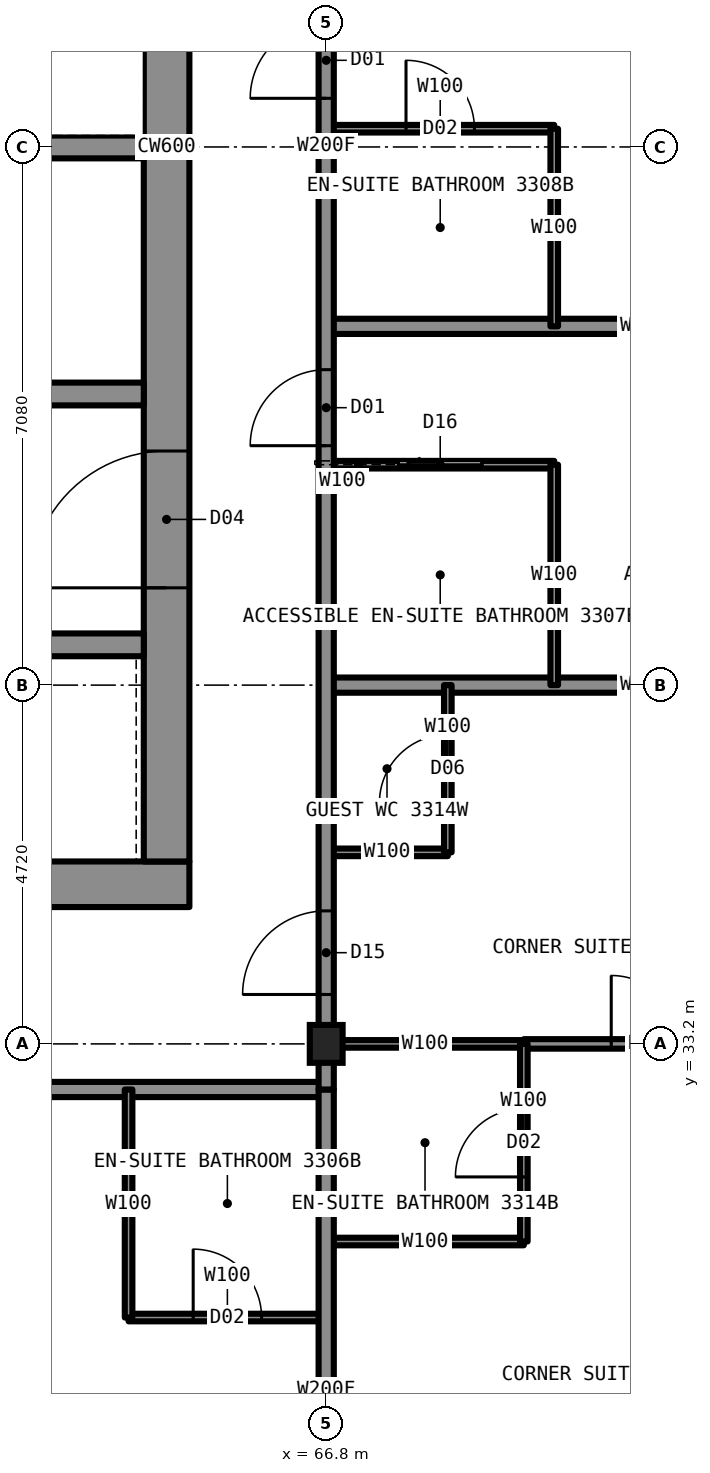
"""IFC4 building model, lengths in metres.
Left out: names, types, materials, properties, quantities, classifications, styles, units other than length and angle.
Written with IfcOpenShell. Run it as: python <this file> out.ifc"""

import sys

from ifc_helpers import new_model, si_unit, direction, frame, frame_2d, origin, origin_2d, place, context, subcontext, project, spatial, rectangle, i_section, extrude, element, fill, save


model = new_model("IFC4")
c1 = context("Model", 3, precision=1e-05, world=origin(), true_north=direction((0.0, 1.0)))
c2 = subcontext(c1, "Body", "Model", "MODEL_VIEW")
j1 = project(units=[si_unit("LENGTHUNIT", "METRE"), si_unit("PLANEANGLEUNIT", "RADIAN")], contexts=[c1])
p1 = place(None, origin())
s1 = spatial("IfcSite", under=j1, at=p1, CompositionType="ELEMENT")
p2 = place(p1, origin())
s2 = spatial("IfcBuilding", under=s1, at=p2, CompositionType="ELEMENT")
p3 = place(p2, frame((0.0, 0.0, 124.9)))
s3 = spatial("IfcBuildingStorey", under=s2, at=p3, CompositionType="ELEMENT", Elevation=124.9)
p4 = place(p3, frame((66.8, 33.2, 0.0), z_axis=(0.0, 0.0, 1.0), x_axis=(1.0, 0.0, 0.0)))
e1 = element("IfcColumn", 1, at=p4, inside=s3, PredefinedType="COLUMN", context=c2, shape_type="SweptSolid", body=[
    extrude(i_section(OverallWidth=0.432, OverallDepth=0.498, WebThickness=0.056, FlangeThickness=0.089, at=origin_2d()), origin(), (0.0, 0.0, 1.0), 3.5),
])
p5 = place(p3, frame((45.0, 35.3, 0.0), z_axis=(0.0, 0.0, 1.0), x_axis=(1.0, 0.0, 0.0)))
e2 = element("IfcWall", 2, at=p5, inside=s3, PredefinedType="SHEAR", context=c2, shape_type="SweptSolid", body=[
    extrude(rectangle(XDim=20.0, YDim=0.6, at=frame_2d((10.0, 0.0))), origin(), (0.0, 0.0, 1.0), 3.5),
])
p6 = place(p3, frame((64.7, 35.6, 0.0), z_axis=(0.0, 0.0, 1.0), x_axis=(0.0, 1.0, 0.0)))
e3 = element("IfcWall", 3, at=p6, inside=s3, PredefinedType="SHEAR", context=c2, shape_type="SweptSolid", body=[
    extrude(rectangle(XDim=18.8, YDim=0.6, at=frame_2d((9.4, 0.0))), origin(), (0.0, 0.0, 1.0), 3.5),
])
p7 = place(p6, frame((13.4, 0.0, 0.0)))
e4 = element("IfcOpeningElement", 4, at=p7, cuts=e3, PredefinedType="OPENING", context=c2, shape_type="SweptSolid", body=[
    extrude(rectangle(XDim=1.8, YDim=2.2, at=frame_2d((0.9, 1.1))), frame((0.0, 0.31, 0.0), z_axis=(0.0, -1.0, 0.0), x_axis=(1.0, 0.0, 0.0)), (0.0, 0.0, 1.0), 0.62),
])
p8 = place(p6, frame((3.6, 0.0, 0.0)))
e5 = element("IfcOpeningElement", 5, at=p8, cuts=e3, PredefinedType="OPENING", context=c2, shape_type="SweptSolid", body=[
    extrude(rectangle(XDim=1.8, YDim=2.2, at=frame_2d((0.9, 1.1))), frame((0.0, 0.31, 0.0), z_axis=(0.0, -1.0, 0.0), x_axis=(1.0, 0.0, 0.0)), (0.0, 0.0, 1.0), 0.62),
])
p9 = place(p3, frame((45.6, 38.45, 0.0), z_axis=(0.0, 0.0, 1.0), x_axis=(1.0, 0.0, 0.0)))
e6 = element("IfcWall", 6, at=p9, inside=s3, PredefinedType="SHEAR", context=c2, shape_type="SweptSolid", body=[
    extrude(rectangle(XDim=18.8, YDim=0.3, at=frame_2d((9.4, 0.0))), origin(), (0.0, 0.0, 1.0), 3.5),
])
p10 = place(p3, frame((56.2, 41.75, 0.0), z_axis=(0.0, 0.0, 1.0), x_axis=(1.0, 0.0, 0.0)))
e7 = element("IfcWall", 7, at=p10, inside=s3, PredefinedType="SHEAR", context=c2, shape_type="SweptSolid", body=[
    extrude(rectangle(XDim=8.2, YDim=0.3, at=frame_2d((4.1, 0.0))), origin(), (0.0, 0.0, 1.0), 3.5),
])
p11 = place(p10, frame((3.3, 0.0, 0.0)))
e8 = element("IfcOpeningElement", 8, at=p11, cuts=e7, PredefinedType="OPENING", context=c2, shape_type="SweptSolid", body=[
    extrude(rectangle(XDim=1.0, YDim=2.1, at=frame_2d((0.5, 1.05))), frame((0.0, 0.16, 0.0), z_axis=(0.0, -1.0, 0.0), x_axis=(1.0, 0.0, 0.0)), (0.0, 0.0, 1.0), 0.32),
])
p12 = place(p3, frame((56.5, 45.0, 0.0), z_axis=(0.0, 0.0, 1.0), x_axis=(1.0, 0.0, 0.0)))
e9 = element("IfcWall", 9, at=p12, inside=s3, PredefinedType="SHEAR", context=c2, shape_type="SweptSolid", body=[
    extrude(rectangle(XDim=7.9, YDim=0.3, at=frame_2d((3.95, 0.0))), origin(), (0.0, 0.0, 1.0), 3.5),
])
p13 = place(p3, frame((66.8, 33.2, 0.0), z_axis=(0.0, 0.0, 1.0), x_axis=(1.0, 0.0, 0.0)))
e10 = element("IfcWall", 10, at=p13, inside=s3, PredefinedType="PARTITIONING", context=c2, shape_type="SweptSolid", body=[
    extrude(rectangle(XDim=2.6, YDim=0.1, at=frame_2d((1.3, 0.0))), origin(), (0.0, 0.0, 1.0), 2.573),
])
p14 = place(p3, frame((69.4, 33.2, 0.0), z_axis=(0.0, 0.0, 1.0), x_axis=(1.0, 0.0, 0.0)))
e11 = element("IfcWall", 11, at=p14, inside=s3, PredefinedType="PARTITIONING", context=c2, shape_type="SweptSolid", body=[
    extrude(rectangle(XDim=5.9, YDim=0.125, at=frame_2d((2.95, 0.0))), origin(), (0.0, 0.0, 1.0), 2.573),
])
p15 = place(p14, frame((1.15, 0.0, 0.0)))
e12 = element("IfcOpeningElement", 12, at=p15, cuts=e11, PredefinedType="OPENING", context=c2, shape_type="SweptSolid", body=[
    extrude(rectangle(XDim=0.9, YDim=2.2, at=frame_2d((0.45, 1.1))), frame((0.0, 0.073, 0.0), z_axis=(0.0, -1.0, 0.0), x_axis=(1.0, 0.0, 0.0)), (0.0, 0.0, 1.0), 0.145),
])
p16 = place(p3, frame((43.2, 32.6, 0.0), z_axis=(0.0, 0.0, 1.0), x_axis=(1.0, 0.0, 0.0)))
e13 = element("IfcWall", 13, at=p16, inside=s3, PredefinedType="PARTITIONING", context=c2, shape_type="SweptSolid", body=[
    extrude(rectangle(XDim=23.6, YDim=0.2, at=frame_2d((11.8, 0.0))), origin(), (0.0, 0.0, 1.0), 3.33),
])
p17 = place(p16, frame((3.0, 0.0, 0.0)))
e14 = element("IfcOpeningElement", 14, at=p17, cuts=e13, PredefinedType="OPENING", context=c2, shape_type="SweptSolid", body=[
    extrude(rectangle(XDim=1.0, YDim=2.2, at=frame_2d((0.5, 1.1))), frame((0.0, 0.11, 0.0), z_axis=(0.0, -1.0, 0.0), x_axis=(1.0, 0.0, 0.0)), (0.0, 0.0, 1.0), 0.22),
])
p18 = place(p16, frame((11.29, 0.0, 0.0)))
e15 = element("IfcOpeningElement", 15, at=p18, cuts=e13, PredefinedType="OPENING", context=c2, shape_type="SweptSolid", body=[
    extrude(rectangle(XDim=1.1, YDim=2.2, at=frame_2d((0.55, 1.1))), frame((0.0, 0.11, 0.0), z_axis=(0.0, -1.0, 0.0), x_axis=(1.0, 0.0, 0.0)), (0.0, 0.0, 1.0), 0.22),
])
p19 = place(p3, frame((66.8, 30.6, 0.0), z_axis=(0.0, 0.0, 1.0), x_axis=(1.0, 0.0, 0.0)))
e16 = element("IfcWall", 16, at=p19, inside=s3, PredefinedType="PARTITIONING", context=c2, shape_type="SweptSolid", body=[
    extrude(rectangle(XDim=2.6, YDim=0.1, at=frame_2d((1.3, 0.0))), origin(), (0.0, 0.0, 1.0), 3.33),
])
p20 = place(p3, frame((64.2, 29.6, 0.0), z_axis=(0.0, 0.0, 1.0), x_axis=(1.0, 0.0, 0.0)))
e17 = element("IfcWall", 17, at=p20, inside=s3, PredefinedType="PARTITIONING", context=c2, shape_type="SweptSolid", body=[
    extrude(rectangle(XDim=2.6, YDim=0.1, at=frame_2d((1.3, 0.0))), origin(), (0.0, 0.0, 1.0), 3.33),
])
p21 = place(p20, frame((0.85, 0.0, 0.0)))
e18 = element("IfcOpeningElement", 18, at=p21, cuts=e17, PredefinedType="OPENING", context=c2, shape_type="SweptSolid", body=[
    extrude(rectangle(XDim=0.9, YDim=2.1, at=frame_2d((0.45, 1.05))), frame((0.0, 0.06, 0.0), z_axis=(0.0, -1.0, 0.0), x_axis=(1.0, 0.0, 0.0)), (0.0, 0.0, 1.0), 0.12),
])
p22 = place(p3, frame((66.8, 42.64, 0.0), z_axis=(0.0, 0.0, 1.0), x_axis=(1.0, 0.0, 0.0)))
e19 = element("IfcWall", 19, at=p22, inside=s3, PredefinedType="PARTITIONING", context=c2, shape_type="SweptSolid", body=[
    extrude(rectangle(XDim=8.5, YDim=0.2, at=frame_2d((4.25, 0.0))), origin(), (0.0, 0.0, 1.0), 2.731),
])
p23 = place(p3, frame((66.8, 40.82, 0.0), z_axis=(0.0, 0.0, 1.0), x_axis=(1.0, 0.0, 0.0)))
e20 = element("IfcWall", 20, at=p23, inside=s3, PredefinedType="PARTITIONING", context=c2, shape_type="SweptSolid", body=[
    extrude(rectangle(XDim=3.0, YDim=0.1, at=frame_2d((1.5, 0.0))), origin(), (0.0, 0.0, 1.0), 3.33),
])
p24 = place(p23, frame((0.95, 0.0, 0.0)))
e21 = element("IfcOpeningElement", 21, at=p24, cuts=e20, PredefinedType="OPENING", context=c2, shape_type="SweptSolid", body=[
    extrude(rectangle(XDim=1.1, YDim=2.1, at=frame_2d((0.55, 1.05))), frame((0.0, 0.06, 0.0), z_axis=(0.0, -1.0, 0.0), x_axis=(1.0, 0.0, 0.0)), (0.0, 0.0, 1.0), 0.12),
])
p25 = place(p3, frame((66.8, 37.92, 0.0), z_axis=(0.0, 0.0, 1.0), x_axis=(1.0, 0.0, 0.0)))
e22 = element("IfcWall", 22, at=p25, inside=s3, PredefinedType="PARTITIONING", context=c2, shape_type="SweptSolid", body=[
    extrude(rectangle(XDim=8.5, YDim=0.2, at=frame_2d((4.25, 0.0))), origin(), (0.0, 0.0, 1.0), 2.573),
])
p26 = place(p3, frame((66.8, 35.72, 0.0), z_axis=(0.0, 0.0, 1.0), x_axis=(1.0, 0.0, 0.0)))
e23 = element("IfcWall", 23, at=p26, inside=s3, PredefinedType="PARTITIONING", context=c2, shape_type="SweptSolid", body=[
    extrude(rectangle(XDim=1.6, YDim=0.1, at=frame_2d((0.8, 0.0))), origin(), (0.0, 0.0, 1.0), 3.33),
])
p27 = place(p3, frame((66.8, 45.24, 0.0), z_axis=(0.0, 0.0, 1.0), x_axis=(1.0, 0.0, 0.0)))
e24 = element("IfcWall", 24, at=p27, inside=s3, PredefinedType="PARTITIONING", context=c2, shape_type="SweptSolid", body=[
    extrude(rectangle(XDim=3.0, YDim=0.1, at=frame_2d((1.5, 0.0))), origin(), (0.0, 0.0, 1.0), 3.33),
])
p28 = place(p27, frame((1.05, 0.0, 0.0)))
e25 = element("IfcOpeningElement", 25, at=p28, cuts=e24, PredefinedType="OPENING", context=c2, shape_type="SweptSolid", body=[
    extrude(rectangle(XDim=0.9, YDim=2.1, at=frame_2d((0.45, 1.05))), frame((0.0, 0.06, 0.0), z_axis=(0.0, -1.0, 0.0), x_axis=(1.0, 0.0, 0.0)), (0.0, 0.0, 1.0), 0.12),
])
p29 = place(p3, frame((66.8, 33.22, 0.0), z_axis=(0.0, 0.0, 1.0), x_axis=(0.0, 1.0, 0.0)))
e26 = element("IfcWall", 26, at=p29, inside=s3, PredefinedType="PARTITIONING", context=c2, shape_type="SweptSolid", body=[
    extrude(rectangle(XDim=23.58, YDim=0.2, at=frame_2d((11.79, 0.0))), origin(), (0.0, 0.0, 1.0), 3.33),
])
p30 = place(p29, frame((7.85, 0.0, 0.0)))
e27 = element("IfcOpeningElement", 27, at=p30, cuts=e26, PredefinedType="OPENING", context=c2, shape_type="SweptSolid", body=[
    extrude(rectangle(XDim=1.0, YDim=2.2, at=frame_2d((0.5, 1.1))), frame((0.0, 0.11, 0.0), z_axis=(0.0, -1.0, 0.0), x_axis=(1.0, 0.0, 0.0)), (0.0, 0.0, 1.0), 0.22),
])
p31 = place(p29, frame((12.42, 0.0, 0.0)))
e28 = element("IfcOpeningElement", 28, at=p31, cuts=e26, PredefinedType="OPENING", context=c2, shape_type="SweptSolid", body=[
    extrude(rectangle(XDim=1.0, YDim=2.2, at=frame_2d((0.5, 1.1))), frame((0.0, 0.11, 0.0), z_axis=(0.0, -1.0, 0.0), x_axis=(1.0, 0.0, 0.0)), (0.0, 0.0, 1.0), 0.22),
])
p32 = place(p29, frame((21.83, 0.0, 0.0)))
e29 = element("IfcOpeningElement", 29, at=p32, cuts=e26, PredefinedType="OPENING", context=c2, shape_type="SweptSolid", body=[
    extrude(rectangle(XDim=1.1, YDim=2.2, at=frame_2d((0.55, 1.1))), frame((0.0, 0.11, 0.0), z_axis=(0.0, -1.0, 0.0), x_axis=(1.0, 0.0, 0.0)), (0.0, 0.0, 1.0), 0.22),
])
p33 = place(p29, frame((0.63, 0.0, 0.0)))
e30 = element("IfcOpeningElement", 30, at=p33, cuts=e26, PredefinedType="OPENING", context=c2, shape_type="SweptSolid", body=[
    extrude(rectangle(XDim=1.1, YDim=2.2, at=frame_2d((0.55, 1.1))), frame((0.0, 0.11, 0.0), z_axis=(0.0, -1.0, 0.0), x_axis=(1.0, 0.0, 0.0)), (0.0, 0.0, 1.0), 0.22),
])
p34 = place(p3, frame((66.8, 24.7, 0.0), z_axis=(0.0, 0.0, 1.0), x_axis=(0.0, 1.0, 0.0)))
e31 = element("IfcWall", 31, at=p34, inside=s3, PredefinedType="PARTITIONING", context=c2, shape_type="SweptSolid", body=[
    extrude(rectangle(XDim=7.9, YDim=0.2, at=frame_2d((3.95, 0.0))), origin(), (0.0, 0.0, 1.0), 2.573),
])
p35 = place(p3, frame((68.4, 35.72, 0.0), z_axis=(0.0, 0.0, 1.0), x_axis=(0.0, 1.0, 0.0)))
e32 = element("IfcWall", 32, at=p35, inside=s3, PredefinedType="PARTITIONING", context=c2, shape_type="SweptSolid", body=[
    extrude(rectangle(XDim=2.2, YDim=0.1, at=frame_2d((1.1, 0.0))), origin(), (0.0, 0.0, 1.0), 3.33),
])
p36 = place(p35, frame((0.65, 0.0, 0.0)))
e33 = element("IfcOpeningElement", 33, at=p36, cuts=e32, PredefinedType="OPENING", context=c2, shape_type="SweptSolid", body=[
    extrude(rectangle(XDim=0.9, YDim=2.1, at=frame_2d((0.45, 1.05))), frame((0.0, 0.06, 0.0), z_axis=(0.0, -1.0, 0.0), x_axis=(1.0, 0.0, 0.0)), (0.0, 0.0, 1.0), 0.12),
])
p37 = place(p3, frame((69.4, 30.6, 0.0), z_axis=(0.0, 0.0, 1.0), x_axis=(0.0, 1.0, 0.0)))
e34 = element("IfcWall", 34, at=p37, inside=s3, PredefinedType="PARTITIONING", context=c2, shape_type="SweptSolid", body=[
    extrude(rectangle(XDim=2.6, YDim=0.1, at=frame_2d((1.3, 0.0))), origin(), (0.0, 0.0, 1.0), 3.33),
])
p38 = place(p37, frame((0.85, 0.0, 0.0)))
e35 = element("IfcOpeningElement", 35, at=p38, cuts=e34, PredefinedType="OPENING", context=c2, shape_type="SweptSolid", body=[
    extrude(rectangle(XDim=0.9, YDim=2.1, at=frame_2d((0.45, 1.05))), frame((0.0, 0.06, 0.0), z_axis=(0.0, -1.0, 0.0), x_axis=(1.0, 0.0, 0.0)), (0.0, 0.0, 1.0), 0.12),
])
p39 = place(p3, frame((69.8, 37.92, 0.0), z_axis=(0.0, 0.0, 1.0), x_axis=(0.0, 1.0, 0.0)))
e36 = element("IfcWall", 36, at=p39, inside=s3, PredefinedType="PARTITIONING", context=c2, shape_type="SweptSolid", body=[
    extrude(rectangle(XDim=2.9, YDim=0.1, at=frame_2d((1.45, 0.0))), origin(), (0.0, 0.0, 1.0), 3.33),
])
p40 = place(p3, frame((69.8, 42.64, 0.0), z_axis=(0.0, 0.0, 1.0), x_axis=(0.0, 1.0, 0.0)))
e37 = element("IfcWall", 37, at=p40, inside=s3, PredefinedType="PARTITIONING", context=c2, shape_type="SweptSolid", body=[
    extrude(rectangle(XDim=2.6, YDim=0.1, at=frame_2d((1.3, 0.0))), origin(), (0.0, 0.0, 1.0), 3.33),
])
p41 = place(p3, frame((64.2, 29.6, 0.0), z_axis=(0.0, 0.0, 1.0), x_axis=(0.0, 1.0, 0.0)))
e38 = element("IfcWall", 38, at=p41, inside=s3, PredefinedType="PARTITIONING", context=c2, shape_type="SweptSolid", body=[
    extrude(rectangle(XDim=3.0, YDim=0.1, at=frame_2d((1.5, 0.0))), origin(), (0.0, 0.0, 1.0), 3.33),
])
p42 = place(p3, frame((66.8, 32.6, 0.0), z_axis=(0.0, 0.0, 1.0), x_axis=(0.0, 1.0, 0.0)))
e39 = element("IfcWall", 39, at=p42, inside=s3, PredefinedType="PARTITIONING", context=c2, shape_type="SweptSolid", body=[
    extrude(rectangle(XDim=0.62, YDim=0.2, at=frame_2d((0.31, 0.0))), origin(), (0.0, 0.0, 1.0), 2.573),
])
p43 = place(p21, origin())
e40 = element("IfcDoor", 40, at=p43, inside=s3, OperationType="SINGLE_SWING_RIGHT", PredefinedType="DOOR", context=c2, shape_type="SweptSolid", body=[
    extrude(rectangle(XDim=0.9, YDim=2.1, at=frame_2d((0.45, 1.05))), frame((0.0, 0.025, 0.0), z_axis=(0.0, -1.0, 0.0), x_axis=(1.0, 0.0, 0.0)), (0.0, 0.0, 1.0), 0.05),
])
fill(e18, e40)
p44 = place(p30, origin())
e41 = element("IfcDoor", 41, at=p44, inside=s3, OperationType="SINGLE_SWING_LEFT", PredefinedType="DOOR", context=c2, shape_type="SweptSolid", body=[
    extrude(rectangle(XDim=1.0, YDim=2.2, at=frame_2d((0.5, 1.1))), frame((0.0, 0.025, 0.0), z_axis=(0.0, -1.0, 0.0), x_axis=(1.0, 0.0, 0.0)), (0.0, 0.0, 1.0), 0.05),
])
fill(e27, e41)
p45 = place(p24, origin())
e42 = element("IfcDoor", 42, at=p45, inside=s3, OperationType="SLIDING_TO_LEFT", PredefinedType="DOOR", context=c2, shape_type="SweptSolid", body=[
    extrude(rectangle(XDim=1.1, YDim=2.1, at=frame_2d((0.55, 1.05))), frame((0.0, 0.025, 0.0), z_axis=(0.0, -1.0, 0.0), x_axis=(1.0, 0.0, 0.0)), (0.0, 0.0, 1.0), 0.05),
])
fill(e21, e42)
p46 = place(p31, origin())
e43 = element("IfcDoor", 43, at=p46, inside=s3, OperationType="SINGLE_SWING_LEFT", PredefinedType="DOOR", context=c2, shape_type="SweptSolid", body=[
    extrude(rectangle(XDim=1.0, YDim=2.2, at=frame_2d((0.5, 1.1))), frame((0.0, 0.025, 0.0), z_axis=(0.0, -1.0, 0.0), x_axis=(1.0, 0.0, 0.0)), (0.0, 0.0, 1.0), 0.05),
])
fill(e28, e43)
p47 = place(p28, origin())
e44 = element("IfcDoor", 44, at=p47, inside=s3, OperationType="SINGLE_SWING_RIGHT", PredefinedType="DOOR", context=c2, shape_type="SweptSolid", body=[
    extrude(rectangle(XDim=0.9, YDim=2.1, at=frame_2d((0.45, 1.05))), frame((0.0, 0.025, 0.0), z_axis=(0.0, -1.0, 0.0), x_axis=(1.0, 0.0, 0.0)), (0.0, 0.0, 1.0), 0.05),
])
fill(e25, e44)
p48 = place(p33, origin())
e45 = element("IfcDoor", 45, at=p48, inside=s3, OperationType="SINGLE_SWING_LEFT", PredefinedType="DOOR", context=c2, shape_type="SweptSolid", body=[
    extrude(rectangle(XDim=1.1, YDim=2.2, at=frame_2d((0.55, 1.1))), frame((0.0, 0.025, 0.0), z_axis=(0.0, -1.0, 0.0), x_axis=(1.0, 0.0, 0.0)), (0.0, 0.0, 1.0), 0.05),
])
fill(e30, e45)
p49 = place(p38, origin())
e46 = element("IfcDoor", 46, at=p49, inside=s3, OperationType="SINGLE_SWING_RIGHT", PredefinedType="DOOR", context=c2, shape_type="SweptSolid", body=[
    extrude(rectangle(XDim=0.9, YDim=2.1, at=frame_2d((0.45, 1.05))), frame((0.0, 0.025, 0.0), z_axis=(0.0, -1.0, 0.0), x_axis=(1.0, 0.0, 0.0)), (0.0, 0.0, 1.0), 0.05),
])
fill(e35, e46)
p50 = place(p15, origin())
e47 = element("IfcDoor", 47, at=p50, inside=s3, OperationType="SINGLE_SWING_LEFT", PredefinedType="DOOR", context=c2, shape_type="SweptSolid", body=[
    extrude(rectangle(XDim=0.9, YDim=2.2, at=frame_2d((0.45, 1.1))), frame((0.0, 0.025, 0.0), z_axis=(0.0, -1.0, 0.0), x_axis=(1.0, 0.0, 0.0)), (0.0, 0.0, 1.0), 0.05),
])
fill(e12, e47)
p51 = place(p36, origin())
e48 = element("IfcDoor", 48, at=p51, inside=s3, OperationType="SINGLE_SWING_LEFT", PredefinedType="DOOR", context=c2, shape_type="SweptSolid", body=[
    extrude(rectangle(XDim=0.9, YDim=2.1, at=frame_2d((0.45, 1.05))), frame((0.0, 0.025, 0.0), z_axis=(0.0, -1.0, 0.0), x_axis=(1.0, 0.0, 0.0)), (0.0, 0.0, 1.0), 0.05),
])
fill(e33, e48)
p52 = place(p8, origin())
e49 = element("IfcDoor", 49, at=p52, inside=s3, OperationType="DOUBLE_DOOR_SINGLE_SWING", PredefinedType="DOOR", context=c2, shape_type="SweptSolid", body=[
    extrude(rectangle(XDim=1.8, YDim=2.2, at=frame_2d((0.9, 1.1))), frame((0.0, 0.025, 0.0), z_axis=(0.0, -1.0, 0.0), x_axis=(1.0, 0.0, 0.0)), (0.0, 0.0, 1.0), 0.05),
])
fill(e5, e49)
save(model, sys.argv[1])
